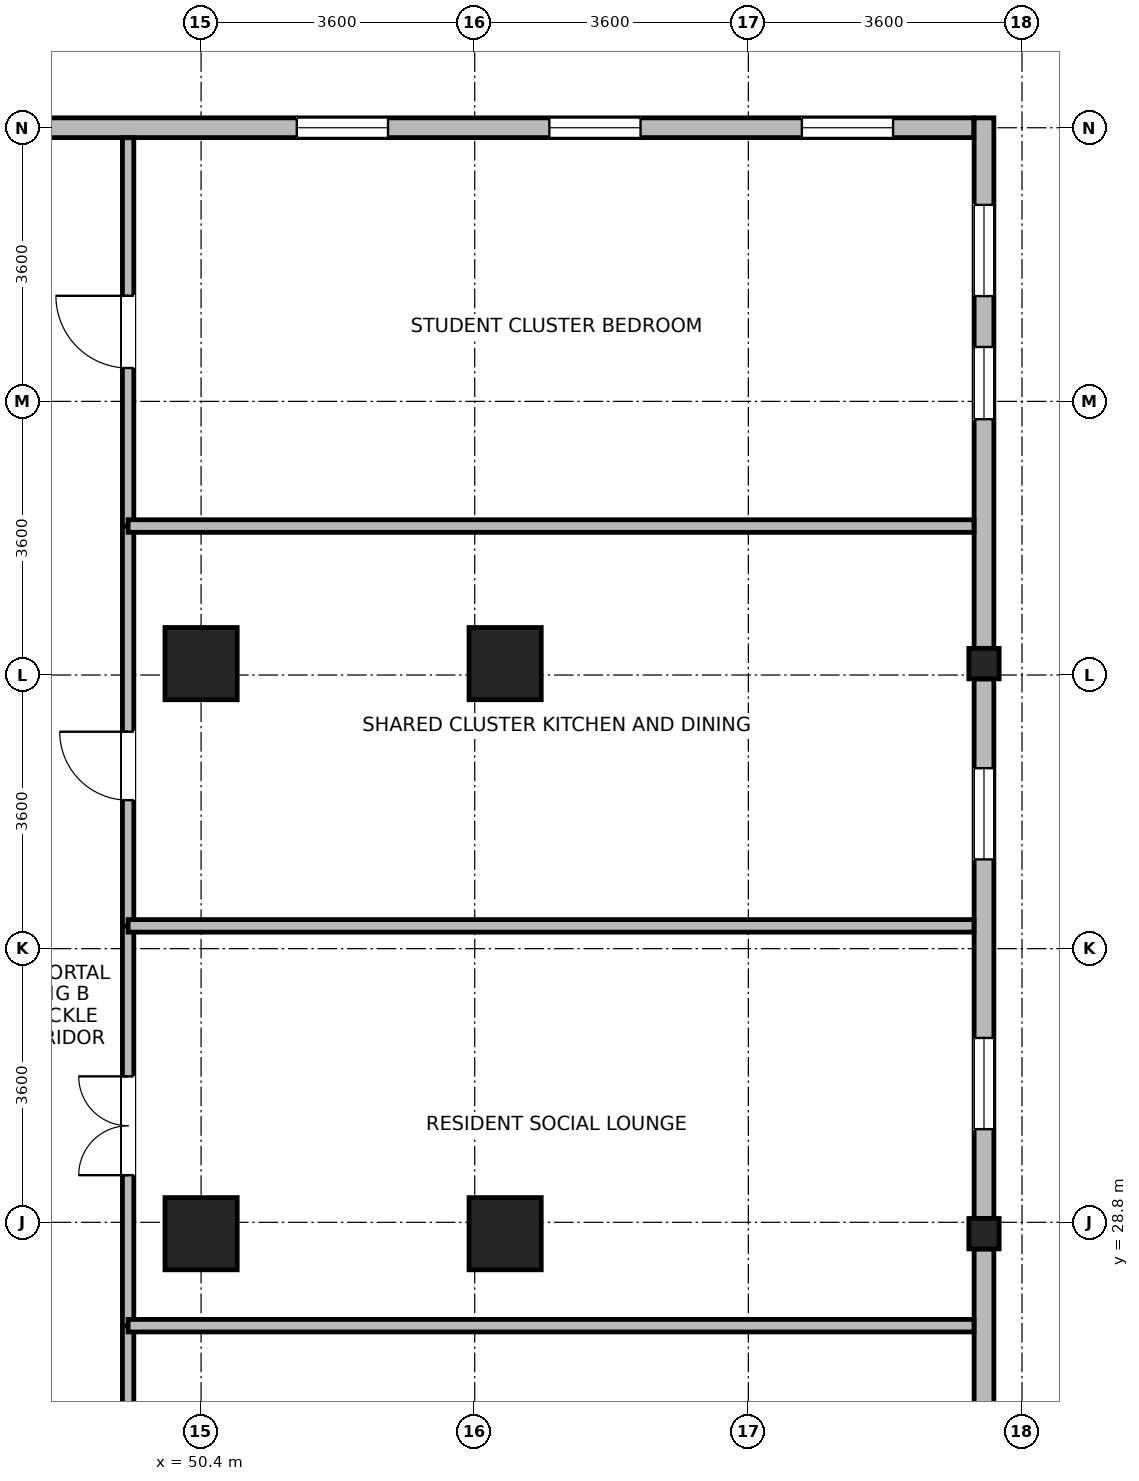
"""IFC4 building model, lengths in metres.
Left out: names, types, materials, properties, quantities, classifications, styles, units other than length and angle.
Written with IfcOpenShell. Run it as: python <this file> out.ifc"""

import sys

from ifc_helpers import new_model, si_unit, direction, frame, frame_2d, origin, origin_2d, place, context, subcontext, project, spatial, rectangle, i_section, extrude, source, transform, mapped, element, fill, save


model = new_model("IFC4")
c1 = context("Model", 3, precision=1e-05, world=origin(), true_north=direction((0.0, 1.0)))
c2 = subcontext(c1, "Body", "Model", "MODEL_VIEW")
j1 = project(units=[si_unit("LENGTHUNIT", "METRE"), si_unit("PLANEANGLEUNIT", "RADIAN")], contexts=[c1])
p1 = place(None, origin())
s1 = spatial("IfcSite", under=j1, at=p1, CompositionType="ELEMENT")
p2 = place(p1, origin())
s2 = spatial("IfcBuilding", under=s1, at=p2, CompositionType="ELEMENT")
p3 = place(p2, frame((0.0, 0.0, 238.8)))
s3 = spatial("IfcBuildingStorey", under=s2, at=p3, CompositionType="ELEMENT", Elevation=238.8)
m1 = source(origin(), c2, "Body", "SweptSolid", [
    extrude(rectangle(XDim=0.95, YDim=0.95, at=origin_2d()), origin(), (0.0, 0.0, 1.0), 3.7),
])
for number, where, z_axis, x_axis in (
    (1, (50.4, 28.65, 0.0), (0.0, 0.0, 1.0), (1.0, 0.0, 0.0)),
    (2, (50.4, 36.15, 0.0), (0.0, 0.0, 1.0), (1.0, 0.0, 0.0)),
    (3, (54.4, 28.65, 0.0), (0.0, 0.0, 1.0), (1.0, 0.0, 0.0)),
    (4, (54.4, 36.15, 0.0), (0.0, 0.0, 1.0), (1.0, 0.0, 0.0)),
):
    element("IfcColumn", number, at=place(p3, frame(where, z_axis=z_axis, x_axis=x_axis)), inside=s3, PredefinedType="COLUMN", context=c2, shape_type="MappedRepresentation", body=[
        mapped(m1, transform((0.0, 0.0, 0.0), x_axis=(1.0, 0.0, 0.0), y_axis=(0.0, 1.0, 0.0), z_axis=(0.0, 0.0, 1.0), scale=1.0)),
    ])
m2 = source(origin(), c2, "Body", "SweptSolid", [
    extrude(i_section(OverallWidth=0.399, OverallDepth=0.4, WebThickness=0.017, FlangeThickness=0.023, FilletRadius=0.015, at=origin_2d()), origin(), (0.0, 0.0, 1.0), 3.7),
])
for number, where, z_axis, x_axis in (
    (5, (60.7, 28.65, 0.0), (0.0, 0.0, 1.0), (1.0, 0.0, 0.0)),
    (6, (60.7, 36.15, 0.0), (0.0, 0.0, 1.0), (1.0, 0.0, 0.0)),
):
    element("IfcColumn", number, at=place(p3, frame(where, z_axis=z_axis, x_axis=x_axis)), inside=s3, PredefinedType="COLUMN", context=c2, shape_type="MappedRepresentation", body=[
        mapped(m2, transform((0.0, 0.0, 0.0), x_axis=(1.0, 0.0, 0.0), y_axis=(0.0, 1.0, 0.0), z_axis=(0.0, 0.0, 1.0), scale=1.0)),
    ])
p4 = place(p3, frame((60.7, 28.449, 0.0), z_axis=(0.0, 0.0, 1.0), x_axis=(0.0, -1.0, 0.0)))
e7 = element("IfcWall", 7, at=p4, inside=s3, PredefinedType="STANDARD", context=c2, shape_type="SweptSolid", body=[
    extrude(rectangle(XDim=6.648, YDim=0.26, at=frame_2d((3.324, 0.0))), origin(), (0.0, 0.0, 1.0), 3.02),
])
p5 = place(p4, frame((4.386, 0.0, 0.85)))
e8 = element("IfcOpeningElement", 8, at=p5, cuts=e7, PredefinedType="OPENING", context=c2, shape_type="SweptSolid", body=[
    extrude(rectangle(XDim=1.2, YDim=1.75, at=frame_2d((0.6, 0.875))), frame((0.0, 0.14, 0.0), z_axis=(0.0, -1.0, 0.0), x_axis=(1.0, 0.0, 0.0)), (0.0, 0.0, 1.0), 0.28),
])
p6 = place(p4, frame((2.849, 0.0, 0.85)))
e9 = element("IfcOpeningElement", 9, at=p6, cuts=e7, PredefinedType="OPENING", context=c2, shape_type="SweptSolid", body=[
    extrude(rectangle(XDim=0.95, YDim=1.75, at=frame_2d((0.475, 0.875))), frame((0.0, 0.14, 0.0), z_axis=(0.0, -1.0, 0.0), x_axis=(1.0, 0.0, 0.0)), (0.0, 0.0, 1.0), 0.28),
])
p7 = place(p3, frame((60.7, 35.949, 0.0), z_axis=(0.0, 0.0, 1.0), x_axis=(0.0, -1.0, 0.0)))
e10 = element("IfcWall", 10, at=p7, inside=s3, PredefinedType="STANDARD", context=c2, shape_type="SweptSolid", body=[
    extrude(rectangle(XDim=7.098, YDim=0.26, at=frame_2d((3.549, 0.0))), origin(), (0.0, 0.0, 1.0), 3.02),
])
p8 = place(p7, frame((1.175, 0.0, 0.85)))
e11 = element("IfcOpeningElement", 11, at=p8, cuts=e10, PredefinedType="OPENING", context=c2, shape_type="SweptSolid", body=[
    extrude(rectangle(XDim=1.2, YDim=1.75, at=frame_2d((0.6, 0.875))), frame((0.0, 0.14, 0.0), z_axis=(0.0, -1.0, 0.0), x_axis=(1.0, 0.0, 0.0)), (0.0, 0.0, 1.0), 0.28),
])
p9 = place(p7, frame((4.723, 0.0, 0.85)))
e12 = element("IfcOpeningElement", 12, at=p9, cuts=e10, PredefinedType="OPENING", context=c2, shape_type="SweptSolid", body=[
    extrude(rectangle(XDim=1.2, YDim=1.75, at=frame_2d((0.6, 0.875))), frame((0.0, 0.14, 0.0), z_axis=(0.0, -1.0, 0.0), x_axis=(1.0, 0.0, 0.0)), (0.0, 0.0, 1.0), 0.28),
])
p10 = place(p3, frame((60.7, 43.33, 0.0), z_axis=(0.0, 0.0, 1.0), x_axis=(0.0, -1.0, 0.0)))
e13 = element("IfcWall", 13, at=p10, inside=s3, PredefinedType="STANDARD", context=c2, shape_type="SweptSolid", body=[
    extrude(rectangle(XDim=6.979, YDim=0.26, at=frame_2d((3.49, 0.0))), origin(), (0.0, 0.0, 1.0), 3.42),
])
p11 = place(p10, frame((1.145, 0.0, 0.85)))
e14 = element("IfcOpeningElement", 14, at=p11, cuts=e13, PredefinedType="OPENING", context=c2, shape_type="SweptSolid", body=[
    extrude(rectangle(XDim=1.2, YDim=1.75, at=frame_2d((0.6, 0.875))), frame((0.0, 0.14, 0.0), z_axis=(0.0, -1.0, 0.0), x_axis=(1.0, 0.0, 0.0)), (0.0, 0.0, 1.0), 0.28),
])
p12 = place(p10, frame((3.014, 0.0, 0.85)))
e15 = element("IfcOpeningElement", 15, at=p12, cuts=e13, PredefinedType="OPENING", context=c2, shape_type="SweptSolid", body=[
    extrude(rectangle(XDim=0.95, YDim=1.75, at=frame_2d((0.475, 0.875))), frame((0.0, 0.14, 0.0), z_axis=(0.0, -1.0, 0.0), x_axis=(1.0, 0.0, 0.0)), (0.0, 0.0, 1.0), 0.28),
])
p13 = place(p3, frame((47.276, 43.2, 0.0), z_axis=(0.0, 0.0, 1.0), x_axis=(1.0, 0.0, 0.0)))
e16 = element("IfcWall", 16, at=p13, inside=s3, PredefinedType="STANDARD", context=c2, shape_type="SweptSolid", body=[
    extrude(rectangle(XDim=13.289, YDim=0.26, at=frame_2d((6.645, 0.0))), origin(), (0.0, 0.0, 1.0), 3.42),
])
p14 = place(p13, frame((4.383, 0.0, 0.85)))
e17 = element("IfcOpeningElement", 17, at=p14, cuts=e16, PredefinedType="OPENING", context=c2, shape_type="SweptSolid", body=[
    extrude(rectangle(XDim=1.2, YDim=1.75, at=frame_2d((0.6, 0.875))), frame((0.0, 0.14, 0.0), z_axis=(0.0, -1.0, 0.0), x_axis=(1.0, 0.0, 0.0)), (0.0, 0.0, 1.0), 0.28),
])
p15 = place(p13, frame((7.706, 0.0, 0.85)))
e18 = element("IfcOpeningElement", 18, at=p15, cuts=e16, PredefinedType="OPENING", context=c2, shape_type="SweptSolid", body=[
    extrude(rectangle(XDim=1.2, YDim=1.75, at=frame_2d((0.6, 0.875))), frame((0.0, 0.14, 0.0), z_axis=(0.0, -1.0, 0.0), x_axis=(1.0, 0.0, 0.0)), (0.0, 0.0, 1.0), 0.28),
])
p16 = place(p13, frame((11.028, 0.0, 0.85)))
e19 = element("IfcOpeningElement", 19, at=p16, cuts=e16, PredefinedType="OPENING", context=c2, shape_type="SweptSolid", body=[
    extrude(rectangle(XDim=1.2, YDim=1.75, at=frame_2d((0.6, 0.875))), frame((0.0, 0.14, 0.0), z_axis=(0.0, -1.0, 0.0), x_axis=(1.0, 0.0, 0.0)), (0.0, 0.0, 1.0), 0.28),
])
p17 = place(p3, frame((49.44, 27.44, 0.0), z_axis=(0.0, 0.0, 1.0), x_axis=(0.0, 1.0, 0.0)))
e20 = element("IfcWall", 20, at=p17, inside=s3, PredefinedType="PARTITIONING", context=c2, shape_type="SweptSolid", body=[
    extrude(rectangle(XDim=5.26, YDim=0.15, at=frame_2d((2.63, 0.0))), origin(), (0.0, 0.0, 1.0), 3.42),
])
p18 = place(p17, frame((1.98, 0.0, 0.0)))
e21 = element("IfcOpeningElement", 21, at=p18, cuts=e20, PredefinedType="OPENING", context=c2, shape_type="SweptSolid", body=[
    extrude(rectangle(XDim=1.3, YDim=2.12, at=frame_2d((0.65, 1.06))), frame((0.0, 0.085, 0.0), z_axis=(0.0, -1.0, 0.0), x_axis=(1.0, 0.0, 0.0)), (0.0, 0.0, 1.0), 0.17),
])
p19 = place(p3, frame((49.44, 32.7, 0.0), z_axis=(0.0, 0.0, 1.0), x_axis=(0.0, 1.0, 0.0)))
e22 = element("IfcWall", 22, at=p19, inside=s3, PredefinedType="PARTITIONING", context=c2, shape_type="SweptSolid", body=[
    extrude(rectangle(XDim=5.26, YDim=0.15, at=frame_2d((2.63, 0.0))), origin(), (0.0, 0.0, 1.0), 3.42),
])
p20 = place(p19, frame((1.654, 0.0, 0.0)))
e23 = element("IfcOpeningElement", 23, at=p20, cuts=e22, PredefinedType="OPENING", context=c2, shape_type="SweptSolid", body=[
    extrude(rectangle(XDim=0.9, YDim=2.08, at=frame_2d((0.45, 1.04))), frame((0.0, 0.085, 0.0), z_axis=(0.0, -1.0, 0.0), x_axis=(1.0, 0.0, 0.0)), (0.0, 0.0, 1.0), 0.17),
])
p21 = place(p3, frame((49.44, 22.2, 0.0), z_axis=(0.0, 0.0, 1.0), x_axis=(0.0, 1.0, 0.0)))
e24 = element("IfcWall", 24, at=p21, inside=s3, PredefinedType="PARTITIONING", context=c2, shape_type="SweptSolid", body=[
    extrude(rectangle(XDim=5.24, YDim=0.15, at=frame_2d((2.62, 0.0))), origin(), (0.0, 0.0, 1.0), 3.42),
])
p22 = place(p21, frame((2.095, 0.0, 0.0)))
e25 = element("IfcOpeningElement", 25, at=p22, cuts=e24, PredefinedType="OPENING", context=c2, shape_type="SweptSolid", body=[
    extrude(rectangle(XDim=1.05, YDim=2.12, at=frame_2d((0.525, 1.06))), frame((0.0, 0.085, 0.0), z_axis=(0.0, -1.0, 0.0), x_axis=(1.0, 0.0, 0.0)), (0.0, 0.0, 1.0), 0.17),
])
p23 = place(p3, frame((49.44, 37.96, 0.0), z_axis=(0.0, 0.0, 1.0), x_axis=(0.0, 1.0, 0.0)))
e26 = element("IfcWall", 26, at=p23, inside=s3, PredefinedType="PARTITIONING", context=c2, shape_type="SweptSolid", body=[
    extrude(rectangle(XDim=5.108, YDim=0.15, at=frame_2d((2.554, 0.0))), origin(), (0.0, 0.0, 1.0), 3.42),
])
p24 = place(p23, frame((2.079, 0.0, 0.0)))
e27 = element("IfcOpeningElement", 27, at=p24, cuts=e26, PredefinedType="OPENING", context=c2, shape_type="SweptSolid", body=[
    extrude(rectangle(XDim=0.95, YDim=2.1, at=frame_2d((0.475, 1.05))), frame((0.0, 0.085, 0.0), z_axis=(0.0, -1.0, 0.0), x_axis=(1.0, 0.0, 0.0)), (0.0, 0.0, 1.0), 0.17),
])
for number, where, z_axis, x_axis in (
    (28, (49.44, 27.44, 0.0), (0.0, 0.0, 1.0), (1.0, 0.0, 0.0)),
    (29, (49.44, 32.7, 0.0), (0.0, 0.0, 1.0), (1.0, 0.0, 0.0)),
    (30, (49.44, 37.96, 0.0), (0.0, 0.0, 1.0), (1.0, 0.0, 0.0)),
):
    element("IfcWall", number, at=place(p3, frame(where, z_axis=z_axis, x_axis=x_axis)), inside=s3, PredefinedType="PARTITIONING", context=c2, shape_type="SweptSolid", body=[
        extrude(rectangle(XDim=11.128, YDim=0.165, at=frame_2d((5.564, 0.0))), origin(), (0.0, 0.0, 1.0), 3.42),
    ])
p25 = place(p8, origin())
e31 = element("IfcWindow", 31, at=p25, inside=s3, PartitioningType="SINGLE_PANEL", PredefinedType="WINDOW", context=c2, shape_type="SweptSolid", body=[
    extrude(rectangle(XDim=1.2, YDim=1.75, at=frame_2d((0.6, 0.875))), frame((0.0, 0.03, 0.0), z_axis=(0.0, -1.0, 0.0), x_axis=(1.0, 0.0, 0.0)), (0.0, 0.0, 1.0), 0.06),
])
fill(e11, e31)
p26 = place(p9, origin())
e32 = element("IfcWindow", 32, at=p26, inside=s3, PartitioningType="SINGLE_PANEL", PredefinedType="WINDOW", context=c2, shape_type="SweptSolid", body=[
    extrude(rectangle(XDim=1.2, YDim=1.75, at=frame_2d((0.6, 0.875))), frame((0.0, 0.03, 0.0), z_axis=(0.0, -1.0, 0.0), x_axis=(1.0, 0.0, 0.0)), (0.0, 0.0, 1.0), 0.06),
])
fill(e12, e32)
p27 = place(p11, origin())
e33 = element("IfcWindow", 33, at=p27, inside=s3, PartitioningType="SINGLE_PANEL", PredefinedType="WINDOW", context=c2, shape_type="SweptSolid", body=[
    extrude(rectangle(XDim=1.2, YDim=1.75, at=frame_2d((0.6, 0.875))), frame((0.0, 0.03, 0.0), z_axis=(0.0, -1.0, 0.0), x_axis=(1.0, 0.0, 0.0)), (0.0, 0.0, 1.0), 0.06),
])
fill(e14, e33)
p28 = place(p12, origin())
e34 = element("IfcWindow", 34, at=p28, inside=s3, PartitioningType="SINGLE_PANEL", PredefinedType="WINDOW", context=c2, shape_type="SweptSolid", body=[
    extrude(rectangle(XDim=0.95, YDim=1.75, at=frame_2d((0.475, 0.875))), frame((0.0, 0.03, 0.0), z_axis=(0.0, -1.0, 0.0), x_axis=(1.0, 0.0, 0.0)), (0.0, 0.0, 1.0), 0.06),
])
fill(e15, e34)
p29 = place(p14, origin())
e35 = element("IfcWindow", 35, at=p29, inside=s3, PartitioningType="SINGLE_PANEL", PredefinedType="WINDOW", context=c2, shape_type="SweptSolid", body=[
    extrude(rectangle(XDim=1.2, YDim=1.75, at=frame_2d((0.6, 0.875))), frame((0.0, 0.03, 0.0), z_axis=(0.0, -1.0, 0.0), x_axis=(1.0, 0.0, 0.0)), (0.0, 0.0, 1.0), 0.06),
])
fill(e17, e35)
p30 = place(p15, origin())
e36 = element("IfcWindow", 36, at=p30, inside=s3, PartitioningType="SINGLE_PANEL", PredefinedType="WINDOW", context=c2, shape_type="SweptSolid", body=[
    extrude(rectangle(XDim=1.2, YDim=1.75, at=frame_2d((0.6, 0.875))), frame((0.0, 0.03, 0.0), z_axis=(0.0, -1.0, 0.0), x_axis=(1.0, 0.0, 0.0)), (0.0, 0.0, 1.0), 0.06),
])
fill(e18, e36)
p31 = place(p16, origin())
e37 = element("IfcWindow", 37, at=p31, inside=s3, PartitioningType="SINGLE_PANEL", PredefinedType="WINDOW", context=c2, shape_type="SweptSolid", body=[
    extrude(rectangle(XDim=1.2, YDim=1.75, at=frame_2d((0.6, 0.875))), frame((0.0, 0.03, 0.0), z_axis=(0.0, -1.0, 0.0), x_axis=(1.0, 0.0, 0.0)), (0.0, 0.0, 1.0), 0.06),
])
fill(e19, e37)
p32 = place(p18, origin())
e38 = element("IfcDoor", 38, at=p32, inside=s3, OperationType="DOUBLE_DOOR_SINGLE_SWING", PredefinedType="DOOR", context=c2, shape_type="SweptSolid", body=[
    extrude(rectangle(XDim=1.3, YDim=2.12, at=frame_2d((0.65, 1.06))), frame((0.0, 0.025, 0.0), z_axis=(0.0, -1.0, 0.0), x_axis=(1.0, 0.0, 0.0)), (0.0, 0.0, 1.0), 0.05),
])
fill(e21, e38)
p33 = place(p20, origin())
e39 = element("IfcDoor", 39, at=p33, inside=s3, OperationType="SINGLE_SWING_RIGHT", PredefinedType="DOOR", context=c2, shape_type="SweptSolid", body=[
    extrude(rectangle(XDim=0.9, YDim=2.08, at=frame_2d((0.45, 1.04))), frame((0.0, 0.025, 0.0), z_axis=(0.0, -1.0, 0.0), x_axis=(1.0, 0.0, 0.0)), (0.0, 0.0, 1.0), 0.05),
])
fill(e23, e39)
p34 = place(p24, origin())
e40 = element("IfcDoor", 40, at=p34, inside=s3, OperationType="SINGLE_SWING_RIGHT", PredefinedType="DOOR", context=c2, shape_type="SweptSolid", body=[
    extrude(rectangle(XDim=0.95, YDim=2.1, at=frame_2d((0.475, 1.05))), frame((0.0, 0.025, 0.0), z_axis=(0.0, -1.0, 0.0), x_axis=(1.0, 0.0, 0.0)), (0.0, 0.0, 1.0), 0.05),
])
fill(e27, e40)
save(model, sys.argv[1])
